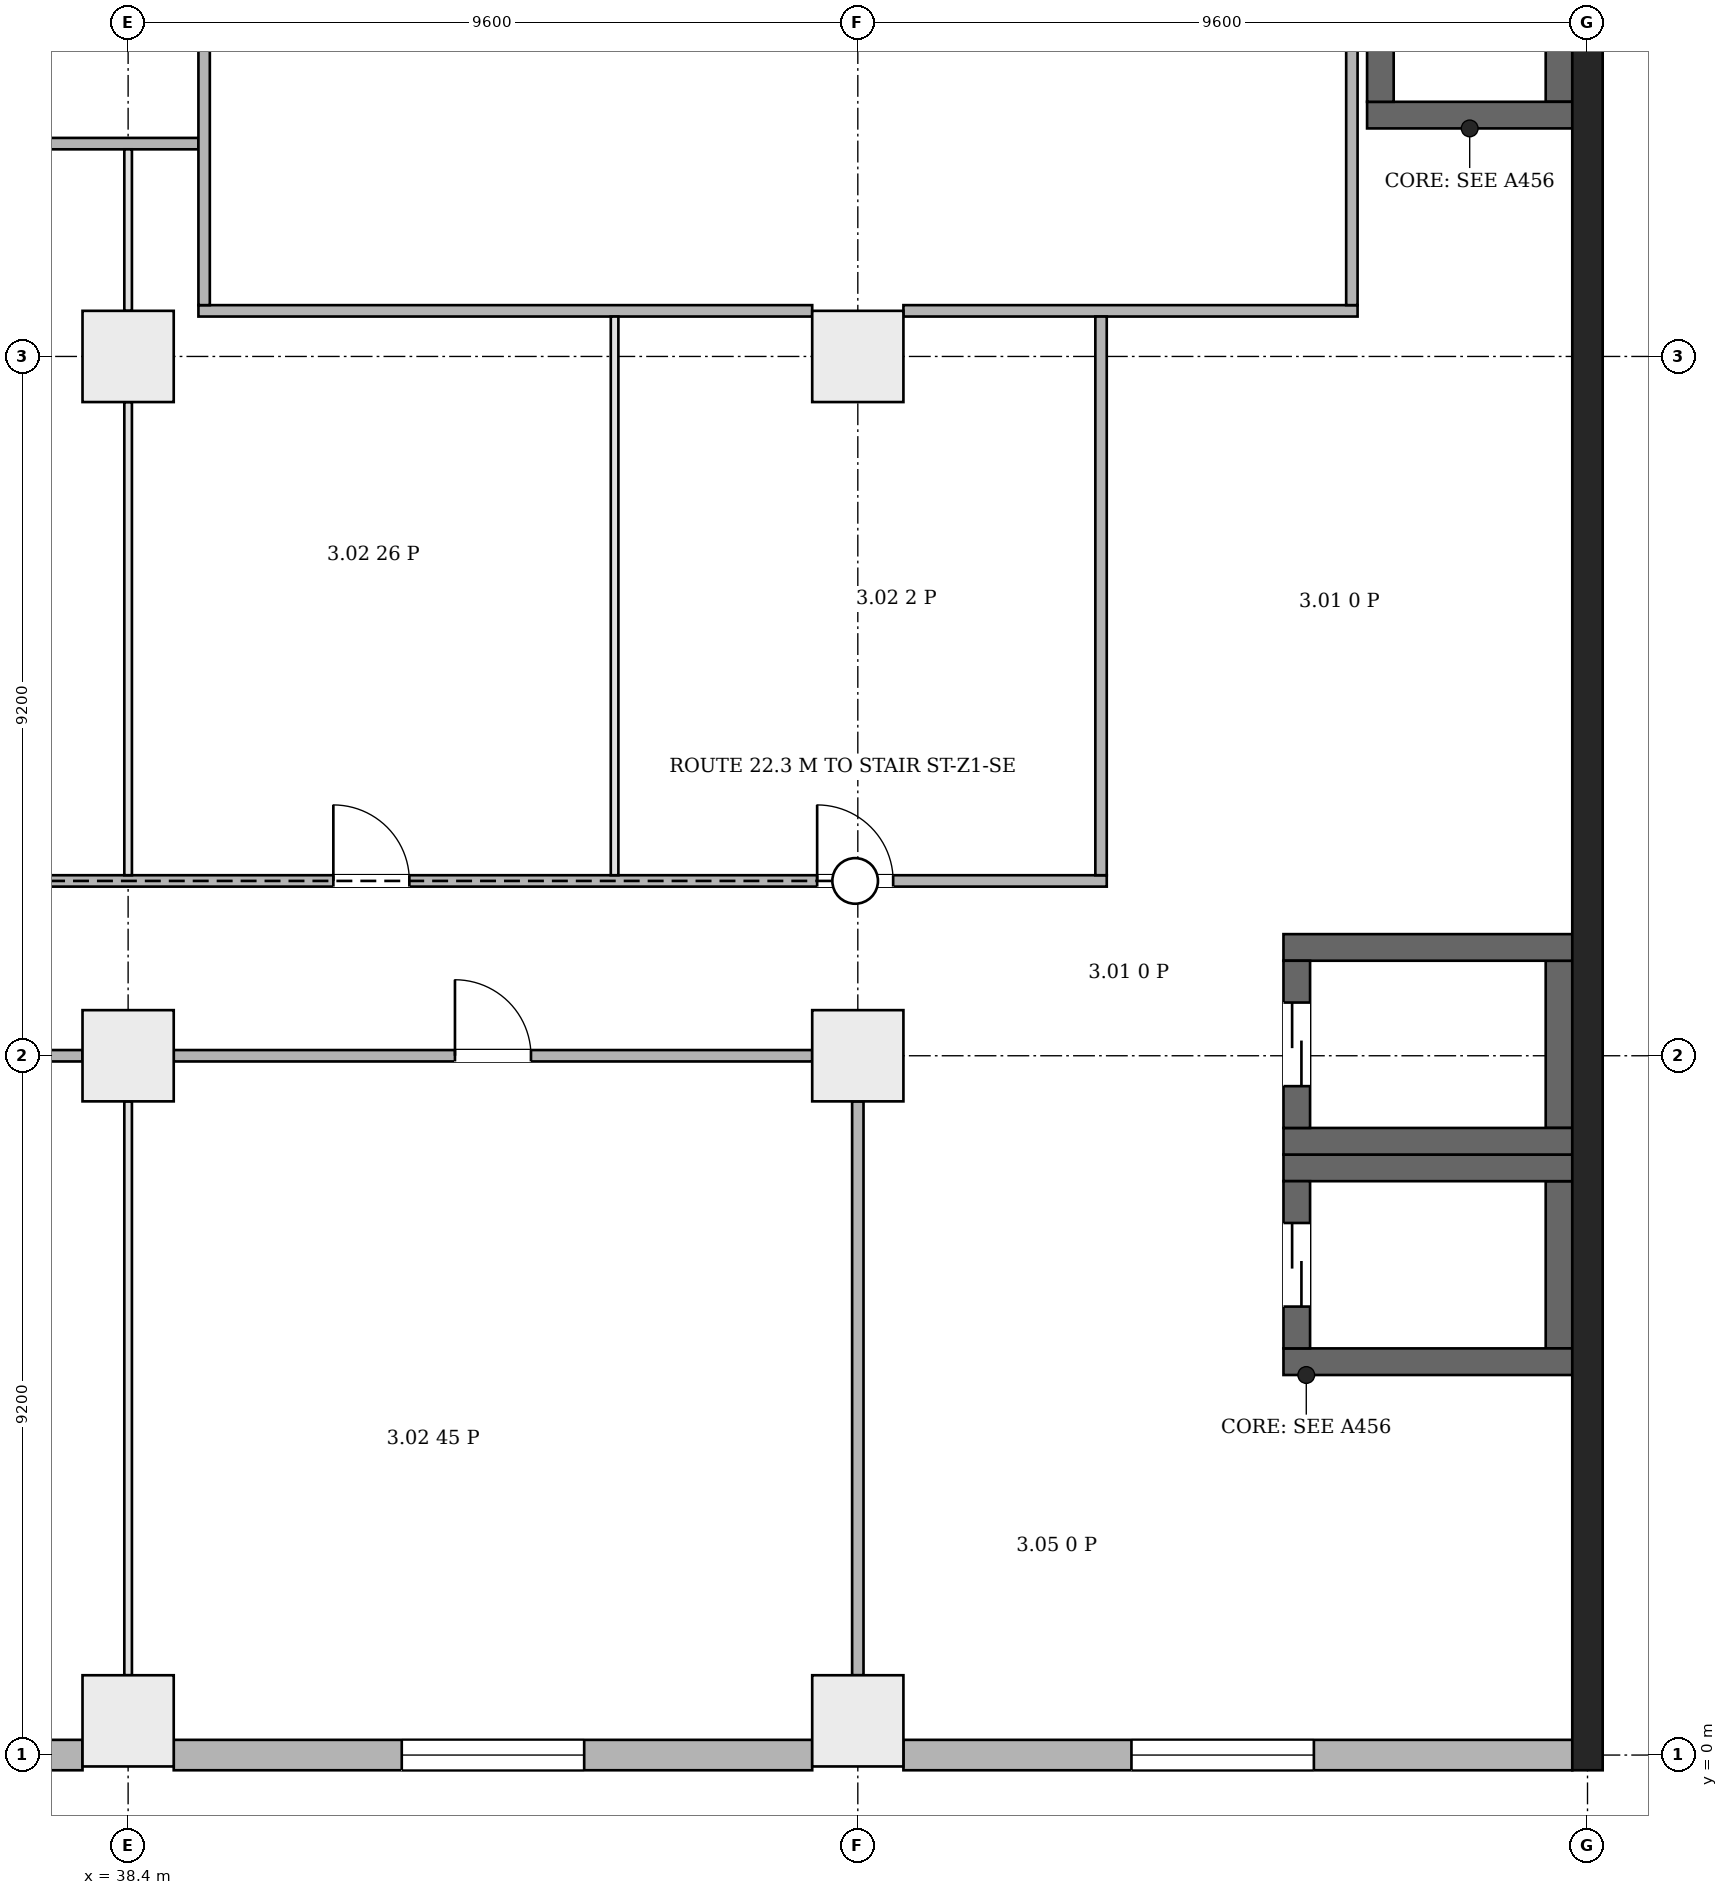
"""IFC4 building model, lengths in metres.
Left out: names, types, materials, properties, quantities, classifications, styles, units other than length and angle.
Written with IfcOpenShell. Run it as: python <this file> out.ifc"""

import sys

from ifc_helpers import new_model, si_unit, direction, frame, frame_2d, origin, origin_2d, place, context, subcontext, project, spatial, rectangle, extrude, element, fill, save


model = new_model("IFC4")
c1 = context("Model", 3, precision=1e-05, world=origin(), true_north=direction((0.0, 1.0)))
c2 = subcontext(c1, "Body", "Model", "MODEL_VIEW")
j1 = project(units=[si_unit("LENGTHUNIT", "METRE"), si_unit("PLANEANGLEUNIT", "RADIAN")], contexts=[c1])
p1 = place(None, origin())
s1 = spatial("IfcSite", under=j1, at=p1, CompositionType="ELEMENT")
p2 = place(p1, origin())
s2 = spatial("IfcBuilding", under=s1, at=p2, CompositionType="ELEMENT")
p3 = place(p2, frame((0.0, 0.0, 21.7)))
s3 = spatial("IfcBuildingStorey", under=s2, at=p3, CompositionType="ELEMENT", Elevation=21.7)
p4 = place(p3, frame((57.6, -0.2, 0.0), z_axis=(0.0, 0.0, 1.0), x_axis=(0.0, 1.0, 0.0)))
e1 = element("IfcWall", 1, at=p4, inside=s3, PredefinedType="SHEAR", context=c2, shape_type="SweptSolid", body=[
    extrude(rectangle(XDim=46.88, YDim=0.4, at=frame_2d((23.44, 0.0))), origin(), (0.0, 0.0, 1.0), 5.0),
])
for number, where, z_axis, x_axis in (
    (2, (53.6, 5.175, 0.0), (0.0, 0.0, 1.0), (1.0, 0.0, 0.0)),
    (3, (53.6, 7.725, 0.0), (0.0, 0.0, 1.0), (1.0, 0.0, 0.0)),
):
    element("IfcWall", number, at=place(p3, frame(where, z_axis=z_axis, x_axis=x_axis)), inside=s3, PredefinedType="SHEAR", context=c2, shape_type="SweptSolid", body=[
        extrude(rectangle(XDim=3.8, YDim=0.35, at=frame_2d((1.9, 0.0))), origin(), (0.0, 0.0, 1.0), 5.0),
    ])
p5 = place(p3, frame((53.775, 5.35, 0.0), z_axis=(0.0, 0.0, 1.0), x_axis=(0.0, 1.0, 0.0)))
e4 = element("IfcWall", 4, at=p5, inside=s3, PredefinedType="SHEAR", context=c2, shape_type="SweptSolid", body=[
    extrude(rectangle(XDim=2.2, YDim=0.35, at=frame_2d((1.1, 0.0))), origin(), (0.0, 0.0, 1.0), 5.0),
])
p6 = place(p5, frame((0.55, 0.0, 0.0)))
e5 = element("IfcOpeningElement", 5, at=p6, cuts=e4, PredefinedType="OPENING", context=c2, shape_type="SweptSolid", body=[
    extrude(rectangle(XDim=1.1, YDim=2.1, at=frame_2d((0.55, 1.05))), frame((0.0, 0.185, 0.0), z_axis=(0.0, -1.0, 0.0), x_axis=(1.0, 0.0, 0.0)), (0.0, 0.0, 1.0), 0.37),
])
p7 = place(p3, frame((57.225, 5.35, 0.0), z_axis=(0.0, 0.0, 1.0), x_axis=(0.0, 1.0, 0.0)))
e6 = element("IfcWall", 6, at=p7, inside=s3, PredefinedType="SHEAR", context=c2, shape_type="SweptSolid", body=[
    extrude(rectangle(XDim=2.2, YDim=0.35, at=frame_2d((1.1, 0.0))), origin(), (0.0, 0.0, 1.0), 5.0),
])
for number, where, z_axis, x_axis in (
    (7, (53.6, 8.075, 0.0), (0.0, 0.0, 1.0), (1.0, 0.0, 0.0)),
    (8, (53.6, 10.625, 0.0), (0.0, 0.0, 1.0), (1.0, 0.0, 0.0)),
):
    element("IfcWall", number, at=place(p3, frame(where, z_axis=z_axis, x_axis=x_axis)), inside=s3, PredefinedType="SHEAR", context=c2, shape_type="SweptSolid", body=[
        extrude(rectangle(XDim=3.8, YDim=0.35, at=frame_2d((1.9, 0.0))), origin(), (0.0, 0.0, 1.0), 5.0),
    ])
p8 = place(p3, frame((53.775, 8.25, 0.0), z_axis=(0.0, 0.0, 1.0), x_axis=(0.0, 1.0, 0.0)))
e9 = element("IfcWall", 9, at=p8, inside=s3, PredefinedType="SHEAR", context=c2, shape_type="SweptSolid", body=[
    extrude(rectangle(XDim=2.2, YDim=0.35, at=frame_2d((1.1, 0.0))), origin(), (0.0, 0.0, 1.0), 5.0),
])
p9 = place(p8, frame((0.55, 0.0, 0.0)))
e10 = element("IfcOpeningElement", 10, at=p9, cuts=e9, PredefinedType="OPENING", context=c2, shape_type="SweptSolid", body=[
    extrude(rectangle(XDim=1.1, YDim=2.1, at=frame_2d((0.55, 1.05))), frame((0.0, 0.185, 0.0), z_axis=(0.0, -1.0, 0.0), x_axis=(1.0, 0.0, 0.0)), (0.0, 0.0, 1.0), 0.37),
])
p10 = place(p3, frame((57.225, 8.25, 0.0), z_axis=(0.0, 0.0, 1.0), x_axis=(0.0, 1.0, 0.0)))
e11 = element("IfcWall", 11, at=p10, inside=s3, PredefinedType="SHEAR", context=c2, shape_type="SweptSolid", body=[
    extrude(rectangle(XDim=2.2, YDim=0.35, at=frame_2d((1.1, 0.0))), origin(), (0.0, 0.0, 1.0), 5.0),
])
p11 = place(p3, frame((54.7, 21.575, 0.0), z_axis=(0.0, 0.0, 1.0), x_axis=(1.0, 0.0, 0.0)))
e12 = element("IfcWall", 12, at=p11, inside=s3, PredefinedType="SHEAR", context=c2, shape_type="SweptSolid", body=[
    extrude(rectangle(XDim=2.7, YDim=0.35, at=frame_2d((1.35, 0.0))), origin(), (0.0, 0.0, 1.0), 5.0),
])
for number, where, z_axis, x_axis in (
    (13, (54.875, 21.75, 0.0), (0.0, 0.0, 1.0), (0.0, 1.0, 0.0)),
    (14, (57.225, 21.75, 0.0), (0.0, 0.0, 1.0), (0.0, 1.0, 0.0)),
):
    element("IfcWall", number, at=place(p3, frame(where, z_axis=z_axis, x_axis=x_axis)), inside=s3, PredefinedType="SHEAR", context=c2, shape_type="SweptSolid", body=[
        extrude(rectangle(XDim=3.5, YDim=0.35, at=frame_2d((1.75, 0.0))), origin(), (0.0, 0.0, 1.0), 5.0),
    ])
for number, where, z_axis, x_axis in (
    (15, (38.4, 0.45, 0.0), (0.0, 0.0, 1.0), (1.0, 0.0, 0.0)),
    (16, (48.0, 0.45, 0.0), (0.0, 0.0, 1.0), (1.0, 0.0, 0.0)),
    (17, (38.4, 9.2, 0.0), (0.0, 0.0, 1.0), (1.0, 0.0, 0.0)),
    (18, (48.0, 9.2, 0.0), (0.0, 0.0, 1.0), (1.0, 0.0, 0.0)),
    (19, (38.4, 18.4, 0.0), (0.0, 0.0, 1.0), (1.0, 0.0, 0.0)),
    (20, (48.0, 18.4, 0.0), (0.0, 0.0, 1.0), (1.0, 0.0, 0.0)),
):
    element("IfcColumn", number, at=place(p3, frame(where, z_axis=z_axis, x_axis=x_axis)), inside=s3, PredefinedType="COLUMN", context=c2, shape_type="SweptSolid", body=[
        extrude(rectangle(XDim=1.2, YDim=1.2, at=origin_2d()), origin(), (0.0, 0.0, 1.0), 5.0),
    ])
p12 = place(p3, frame((29.4, 0.0, 0.0), z_axis=(0.0, 0.0, 1.0), x_axis=(1.0, 0.0, 0.0)))
e21 = element("IfcWall", 21, at=p12, inside=s3, PredefinedType="ELEMENTEDWALL", context=c2, shape_type="SweptSolid", body=[
    extrude(rectangle(XDim=8.4, YDim=0.4, at=frame_2d((4.2, 0.0))), origin(), (0.0, 0.0, 1.0), 4.65),
])
p13 = place(p12, frame((3.0, 0.0, 1.0)))
e22 = element("IfcOpeningElement", 22, at=p13, cuts=e21, PredefinedType="OPENING", context=c2, shape_type="SweptSolid", body=[
    extrude(rectangle(XDim=2.4, YDim=2.2, at=frame_2d((1.2, 1.1))), frame((0.0, 0.21, 0.0), z_axis=(0.0, -1.0, 0.0), x_axis=(1.0, 0.0, 0.0)), (0.0, 0.0, 1.0), 0.42),
])
p14 = place(p3, frame((39.0, 0.0, 0.0), z_axis=(0.0, 0.0, 1.0), x_axis=(1.0, 0.0, 0.0)))
e23 = element("IfcWall", 23, at=p14, inside=s3, PredefinedType="ELEMENTEDWALL", context=c2, shape_type="SweptSolid", body=[
    extrude(rectangle(XDim=8.4, YDim=0.4, at=frame_2d((4.2, 0.0))), origin(), (0.0, 0.0, 1.0), 4.65),
])
p15 = place(p14, frame((3.0, 0.0, 1.0)))
e24 = element("IfcOpeningElement", 24, at=p15, cuts=e23, PredefinedType="OPENING", context=c2, shape_type="SweptSolid", body=[
    extrude(rectangle(XDim=2.4, YDim=2.2, at=frame_2d((1.2, 1.1))), frame((0.0, 0.21, 0.0), z_axis=(0.0, -1.0, 0.0), x_axis=(1.0, 0.0, 0.0)), (0.0, 0.0, 1.0), 0.42),
])
p16 = place(p3, frame((48.6, 0.0, 0.0), z_axis=(0.0, 0.0, 1.0), x_axis=(1.0, 0.0, 0.0)))
e25 = element("IfcWall", 25, at=p16, inside=s3, PredefinedType="ELEMENTEDWALL", context=c2, shape_type="SweptSolid", body=[
    extrude(rectangle(XDim=8.8, YDim=0.4, at=frame_2d((4.4, 0.0))), origin(), (0.0, 0.0, 1.0), 4.65),
])
p17 = place(p16, frame((3.0, 0.0, 1.0)))
e26 = element("IfcOpeningElement", 26, at=p17, cuts=e25, PredefinedType="OPENING", context=c2, shape_type="SweptSolid", body=[
    extrude(rectangle(XDim=2.4, YDim=2.2, at=frame_2d((1.2, 1.1))), frame((0.0, 0.21, 0.0), z_axis=(0.0, -1.0, 0.0), x_axis=(1.0, 0.0, 0.0)), (0.0, 0.0, 1.0), 0.42),
])
p18 = place(p3, frame((27.206, 11.5, 0.0), z_axis=(0.0, 0.0, 1.0), x_axis=(1.0, 0.0, 0.0)))
e27 = element("IfcWall", 27, at=p18, inside=s3, PredefinedType="PARTITIONING", context=c2, shape_type="SweptSolid", body=[
    extrude(rectangle(XDim=24.069, YDim=0.15, at=frame_2d((12.034, 0.0))), origin(), (0.0, 0.0, 1.0), 4.65),
])
p19 = place(p18, frame((13.894, 0.0, 0.0)))
e28 = element("IfcOpeningElement", 28, at=p19, cuts=e27, PredefinedType="OPENING", context=c2, shape_type="SweptSolid", body=[
    extrude(rectangle(XDim=1.0, YDim=2.1, at=frame_2d((0.5, 1.05))), frame((0.0, 0.085, 0.0), z_axis=(0.0, -1.0, 0.0), x_axis=(1.0, 0.0, 0.0)), (0.0, 0.0, 1.0), 0.17),
])
p20 = place(p18, frame((20.259, 0.0, 0.0)))
e29 = element("IfcOpeningElement", 29, at=p20, cuts=e27, PredefinedType="OPENING", context=c2, shape_type="SweptSolid", body=[
    extrude(rectangle(XDim=1.0, YDim=2.1, at=frame_2d((0.5, 1.05))), frame((0.0, 0.085, 0.0), z_axis=(0.0, -1.0, 0.0), x_axis=(1.0, 0.0, 0.0)), (0.0, 0.0, 1.0), 0.17),
])
p21 = place(p3, frame((29.075, 21.2, 0.0), z_axis=(0.0, 0.0, 1.0), x_axis=(1.0, 0.0, 0.0)))
e30 = element("IfcWall", 30, at=p21, inside=s3, PredefinedType="PARTITIONING", context=c2, shape_type="SweptSolid", body=[
    extrude(rectangle(XDim=10.25, YDim=0.15, at=frame_2d((5.125, 0.0))), origin(), (0.0, 0.0, 1.0), 4.65),
])
p22 = place(p21, frame((1.035, 0.0, 0.0)))
e31 = element("IfcOpeningElement", 31, at=p22, cuts=e30, PredefinedType="OPENING", context=c2, shape_type="SweptSolid", body=[
    extrude(rectangle(XDim=1.0, YDim=2.1, at=frame_2d((0.5, 1.05))), frame((0.0, 0.085, 0.0), z_axis=(0.0, -1.0, 0.0), x_axis=(1.0, 0.0, 0.0)), (0.0, 0.0, 1.0), 0.17),
])
p23 = place(p21, frame((5.625, 0.0, 0.0)))
e32 = element("IfcOpeningElement", 32, at=p23, cuts=e30, PredefinedType="OPENING", context=c2, shape_type="SweptSolid", body=[
    extrude(rectangle(XDim=1.0, YDim=2.1, at=frame_2d((0.5, 1.05))), frame((0.0, 0.085, 0.0), z_axis=(0.0, -1.0, 0.0), x_axis=(1.0, 0.0, 0.0)), (0.0, 0.0, 1.0), 0.17),
])
p24 = place(p3, frame((29.4, 9.2, 0.0), z_axis=(0.0, 0.0, 1.0), x_axis=(1.0, 0.0, 0.0)))
e33 = element("IfcWall", 33, at=p24, inside=s3, PredefinedType="PARTITIONING", context=c2, shape_type="SweptSolid", body=[
    extrude(rectangle(XDim=8.4, YDim=0.15, at=frame_2d((4.2, 0.0))), origin(), (0.0, 0.0, 1.0), 4.25),
])
p25 = place(p24, frame((3.7, 0.0, 0.0)))
e34 = element("IfcOpeningElement", 34, at=p25, cuts=e33, PredefinedType="OPENING", context=c2, shape_type="SweptSolid", body=[
    extrude(rectangle(XDim=1.0, YDim=2.1, at=frame_2d((0.5, 1.05))), frame((0.0, 0.085, 0.0), z_axis=(0.0, -1.0, 0.0), x_axis=(1.0, 0.0, 0.0)), (0.0, 0.0, 1.0), 0.17),
])
p26 = place(p3, frame((38.4, 1.05, 0.0), z_axis=(0.0, 0.0, 1.0), x_axis=(0.0, 1.0, 0.0)))
e35 = element("IfcWall", 35, at=p26, inside=s3, PredefinedType="PARTITIONING", context=c2, shape_type="SweptSolid", body=[
    extrude(rectangle(XDim=7.55, YDim=0.1, at=frame_2d((3.775, 0.0))), origin(), (0.0, 0.0, 1.0), 4.25),
])
p27 = place(p3, frame((38.4, 11.575, 0.0), z_axis=(0.0, 0.0, 1.0), x_axis=(0.0, 1.0, 0.0)))
e36 = element("IfcWall", 36, at=p27, inside=s3, PredefinedType="PARTITIONING", context=c2, shape_type="SweptSolid", body=[
    extrude(rectangle(XDim=6.225, YDim=0.1, at=frame_2d((3.113, 0.0))), origin(), (0.0, 0.0, 1.0), 4.25),
])
p28 = place(p3, frame((38.4, 19.0, 0.0), z_axis=(0.0, 0.0, 1.0), x_axis=(0.0, 1.0, 0.0)))
e37 = element("IfcWall", 37, at=p28, inside=s3, PredefinedType="PARTITIONING", context=c2, shape_type="SweptSolid", body=[
    extrude(rectangle(XDim=2.125, YDim=0.1, at=frame_2d((1.062, 0.0))), origin(), (0.0, 0.0, 1.0), 4.25),
])
p29 = place(p3, frame((39.0, 9.2, 0.0), z_axis=(0.0, 0.0, 1.0), x_axis=(1.0, 0.0, 0.0)))
e38 = element("IfcWall", 38, at=p29, inside=s3, PredefinedType="PARTITIONING", context=c2, shape_type="SweptSolid", body=[
    extrude(rectangle(XDim=8.4, YDim=0.15, at=frame_2d((4.2, 0.0))), origin(), (0.0, 0.0, 1.0), 4.25),
])
p30 = place(p29, frame((3.7, 0.0, 0.0)))
e39 = element("IfcOpeningElement", 39, at=p30, cuts=e38, PredefinedType="OPENING", context=c2, shape_type="SweptSolid", body=[
    extrude(rectangle(XDim=1.0, YDim=2.1, at=frame_2d((0.5, 1.05))), frame((0.0, 0.085, 0.0), z_axis=(0.0, -1.0, 0.0), x_axis=(1.0, 0.0, 0.0)), (0.0, 0.0, 1.0), 0.17),
])
p31 = place(p3, frame((39.325, 19.0, 0.0), z_axis=(0.0, 0.0, 1.0), x_axis=(1.0, 0.0, 0.0)))
e40 = element("IfcWall", 40, at=p31, inside=s3, PredefinedType="PARTITIONING", context=c2, shape_type="SweptSolid", body=[
    extrude(rectangle(XDim=8.075, YDim=0.15, at=frame_2d((4.038, 0.0))), origin(), (0.0, 0.0, 1.0), 4.65),
])
p32 = place(p3, frame((39.4, 19.075, 0.0), z_axis=(0.0, 0.0, 1.0), x_axis=(0.0, 1.0, 0.0)))
e41 = element("IfcWall", 41, at=p32, inside=s3, PredefinedType="PARTITIONING", context=c2, shape_type="SweptSolid", body=[
    extrude(rectangle(XDim=8.0, YDim=0.15, at=frame_2d((4.0, 0.0))), origin(), (0.0, 0.0, 1.0), 4.65),
])
p33 = place(p32, frame((3.425, 0.0, 0.0)))
e42 = element("IfcOpeningElement", 42, at=p33, cuts=e41, PredefinedType="OPENING", context=c2, shape_type="SweptSolid", body=[
    extrude(rectangle(XDim=1.0, YDim=2.1, at=frame_2d((0.5, 1.05))), frame((0.0, 0.085, 0.0), z_axis=(0.0, -1.0, 0.0), x_axis=(1.0, 0.0, 0.0)), (0.0, 0.0, 1.0), 0.17),
])
p34 = place(p3, frame((44.8, 11.575, 0.0), z_axis=(0.0, 0.0, 1.0), x_axis=(0.0, 1.0, 0.0)))
e43 = element("IfcWall", 43, at=p34, inside=s3, PredefinedType="PARTITIONING", context=c2, shape_type="SweptSolid", body=[
    extrude(rectangle(XDim=7.35, YDim=0.1, at=frame_2d((3.675, 0.0))), origin(), (0.0, 0.0, 1.0), 4.65),
])
p35 = place(p3, frame((48.0, 1.05, 0.0), z_axis=(0.0, 0.0, 1.0), x_axis=(0.0, 1.0, 0.0)))
e44 = element("IfcWall", 44, at=p35, inside=s3, PredefinedType="PARTITIONING", context=c2, shape_type="SweptSolid", body=[
    extrude(rectangle(XDim=7.55, YDim=0.15, at=frame_2d((3.775, 0.0))), origin(), (0.0, 0.0, 1.0), 4.25),
])
p36 = place(p3, frame((48.6, 19.0, 0.0), z_axis=(0.0, 0.0, 1.0), x_axis=(1.0, 0.0, 0.0)))
e45 = element("IfcWall", 45, at=p36, inside=s3, PredefinedType="PARTITIONING", context=c2, shape_type="SweptSolid", body=[
    extrude(rectangle(XDim=5.975, YDim=0.15, at=frame_2d((2.987, 0.0))), origin(), (0.0, 0.0, 1.0), 4.65),
])
p37 = place(p3, frame((51.2, 11.575, 0.0), z_axis=(0.0, 0.0, 1.0), x_axis=(0.0, 1.0, 0.0)))
e46 = element("IfcWall", 46, at=p37, inside=s3, PredefinedType="PARTITIONING", context=c2, shape_type="SweptSolid", body=[
    extrude(rectangle(XDim=7.35, YDim=0.15, at=frame_2d((3.675, 0.0))), origin(), (0.0, 0.0, 1.0), 4.65),
])
p38 = place(p3, frame((54.5, 19.075, 0.0), z_axis=(0.0, 0.0, 1.0), x_axis=(0.0, 1.0, 0.0)))
e47 = element("IfcWall", 47, at=p38, inside=s3, PredefinedType="PARTITIONING", context=c2, shape_type="SweptSolid", body=[
    extrude(rectangle(XDim=8.0, YDim=0.15, at=frame_2d((4.0, 0.0))), origin(), (0.0, 0.0, 1.0), 4.65),
])
p39 = place(p15, origin())
e48 = element("IfcWindow", 48, at=p39, inside=s3, PartitioningType="SINGLE_PANEL", PredefinedType="WINDOW", context=c2, shape_type="SweptSolid", body=[
    extrude(rectangle(XDim=2.4, YDim=2.2, at=frame_2d((1.2, 1.1))), frame((0.0, 0.03, 0.0), z_axis=(0.0, -1.0, 0.0), x_axis=(1.0, 0.0, 0.0)), (0.0, 0.0, 1.0), 0.06),
])
fill(e24, e48)
p40 = place(p17, origin())
e49 = element("IfcWindow", 49, at=p40, inside=s3, PartitioningType="SINGLE_PANEL", PredefinedType="WINDOW", context=c2, shape_type="SweptSolid", body=[
    extrude(rectangle(XDim=2.4, YDim=2.2, at=frame_2d((1.2, 1.1))), frame((0.0, 0.03, 0.0), z_axis=(0.0, -1.0, 0.0), x_axis=(1.0, 0.0, 0.0)), (0.0, 0.0, 1.0), 0.06),
])
fill(e26, e49)
p41 = place(p6, origin())
e50 = element("IfcDoor", 50, at=p41, inside=s3, OperationType="DOUBLE_DOOR_SLIDING", PredefinedType="DOOR", context=c2, shape_type="SweptSolid", body=[
    extrude(rectangle(XDim=1.1, YDim=2.1, at=frame_2d((0.55, 1.05))), frame((0.0, 0.025, 0.0), z_axis=(0.0, -1.0, 0.0), x_axis=(1.0, 0.0, 0.0)), (0.0, 0.0, 1.0), 0.05),
])
fill(e5, e50)
p42 = place(p9, origin())
e51 = element("IfcDoor", 51, at=p42, inside=s3, OperationType="DOUBLE_DOOR_SLIDING", PredefinedType="DOOR", context=c2, shape_type="SweptSolid", body=[
    extrude(rectangle(XDim=1.1, YDim=2.1, at=frame_2d((0.55, 1.05))), frame((0.0, 0.025, 0.0), z_axis=(0.0, -1.0, 0.0), x_axis=(1.0, 0.0, 0.0)), (0.0, 0.0, 1.0), 0.05),
])
fill(e10, e51)
p43 = place(p19, origin())
e52 = element("IfcDoor", 52, at=p43, inside=s3, OperationType="SINGLE_SWING_RIGHT", PredefinedType="DOOR", context=c2, shape_type="SweptSolid", body=[
    extrude(rectangle(XDim=1.0, YDim=2.1, at=frame_2d((0.5, 1.05))), frame((0.0, 0.025, 0.0), z_axis=(0.0, -1.0, 0.0), x_axis=(1.0, 0.0, 0.0)), (0.0, 0.0, 1.0), 0.05),
])
fill(e28, e52)
p44 = place(p20, origin())
e53 = element("IfcDoor", 53, at=p44, inside=s3, OperationType="SINGLE_SWING_RIGHT", PredefinedType="DOOR", context=c2, shape_type="SweptSolid", body=[
    extrude(rectangle(XDim=1.0, YDim=2.1, at=frame_2d((0.5, 1.05))), frame((0.0, 0.025, 0.0), z_axis=(0.0, -1.0, 0.0), x_axis=(1.0, 0.0, 0.0)), (0.0, 0.0, 1.0), 0.05),
])
fill(e29, e53)
p45 = place(p30, origin())
e54 = element("IfcDoor", 54, at=p45, inside=s3, OperationType="SINGLE_SWING_LEFT", PredefinedType="DOOR", context=c2, shape_type="SweptSolid", body=[
    extrude(rectangle(XDim=1.0, YDim=2.1, at=frame_2d((0.5, 1.05))), frame((0.0, 0.025, 0.0), z_axis=(0.0, -1.0, 0.0), x_axis=(1.0, 0.0, 0.0)), (0.0, 0.0, 1.0), 0.05),
])
fill(e39, e54)
save(model, sys.argv[1])
